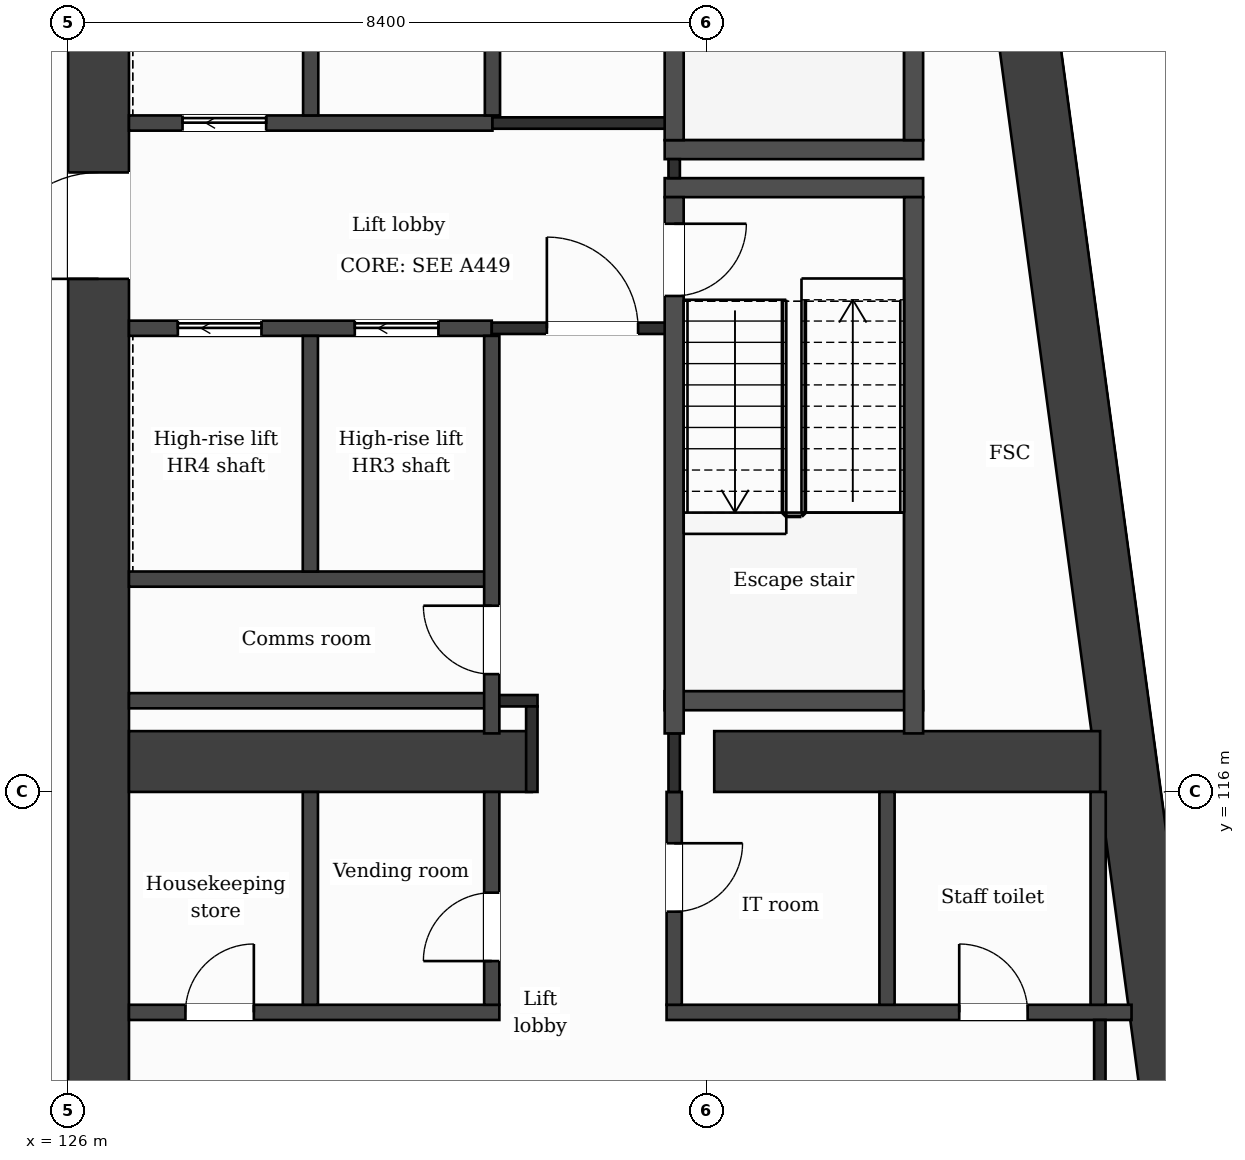
"""IFC4 building model, lengths in metres.
Left out: names, types, materials, properties, quantities, classifications, styles, units other than length and angle.
Written with IfcOpenShell. Run it as: python <this file> out.ifc"""

import sys

from ifc_helpers import new_model, si_unit, direction, frame, frame_2d, origin, place, context, subcontext, project, spatial, rectangle, extrude, element, fill, save


model = new_model("IFC4")
c1 = context("Model", 3, precision=1e-05, world=origin(), true_north=direction((0.0, 1.0)))
c2 = subcontext(c1, "Body", "Model", "MODEL_VIEW")
j1 = project(units=[si_unit("LENGTHUNIT", "METRE"), si_unit("PLANEANGLEUNIT", "RADIAN")], contexts=[c1])
p1 = place(None, origin())
s1 = spatial("IfcSite", under=j1, at=p1, CompositionType="ELEMENT")
p2 = place(p1, origin())
s2 = spatial("IfcBuilding", under=s1, at=p2, CompositionType="ELEMENT")
p3 = place(p2, frame((0.0, 0.0, 202.2)))
s3 = spatial("IfcBuildingStorey", under=s2, at=p3, CompositionType="ELEMENT", Elevation=202.2)
p4 = place(p3, frame((137.82, 132.0, 0.0), z_axis=(0.0, 0.0, 1.0), x_axis=(0.133408347329, -0.991061154956, 0.0)))
e1 = element("IfcWall", 1, at=p4, inside=s3, PredefinedType="SHEAR", context=c2, shape_type="SweptSolid", body=[
    extrude(rectangle(XDim=21.391, YDim=0.8, at=frame_2d((10.696, 0.0))), origin(), (0.0, 0.0, 1.0), 3.7),
])
p5 = place(p3, frame((126.4, 110.8, 0.0), z_axis=(0.0, 0.0, 1.0), x_axis=(0.0, 1.0, 0.0)))
e2 = element("IfcWall", 2, at=p5, inside=s3, PredefinedType="SHEAR", context=c2, shape_type="SweptSolid", body=[
    extrude(rectangle(XDim=21.2, YDim=0.8, at=frame_2d((10.6, 0.0))), origin(), (0.0, 0.0, 1.0), 3.7),
])
p6 = place(p5, frame((11.95, 0.0, 0.0)))
e3 = element("IfcOpeningElement", 3, at=p6, cuts=e2, PredefinedType="OPENING", context=c2, shape_type="SweptSolid", body=[
    extrude(rectangle(XDim=1.4, YDim=2.1, at=frame_2d((0.7, 1.05))), frame((0.0, 0.41, 0.0), z_axis=(0.0, -1.0, 0.0), x_axis=(1.0, 0.0, 0.0)), (0.0, 0.0, 1.0), 0.82),
])
p7 = place(p3, frame((126.8, 116.4, 0.0), z_axis=(0.0, 0.0, 1.0), x_axis=(1.0, 0.0, 0.0)))
e4 = element("IfcWall", 4, at=p7, inside=s3, PredefinedType="SHEAR", context=c2, shape_type="SweptSolid", body=[
    extrude(rectangle(XDim=5.3, YDim=0.8, at=frame_2d((2.65, 0.0))), origin(), (0.0, 0.0, 1.0), 3.7),
])
p8 = place(p3, frame((134.5, 116.4, 0.0), z_axis=(0.0, 0.0, 1.0), x_axis=(1.0, 0.0, 0.0)))
e5 = element("IfcWall", 5, at=p8, inside=s3, PredefinedType="SHEAR", context=c2, shape_type="SweptSolid", body=[
    extrude(rectangle(XDim=5.077, YDim=0.8, at=frame_2d((2.539, 0.0))), origin(), (0.0, 0.0, 1.0), 3.7),
])
p9 = place(p3, frame((126.8, 113.1, 0.0), z_axis=(0.0, 0.0, 1.0), x_axis=(1.0, 0.0, 0.0)))
e6 = element("IfcWall", 6, at=p9, inside=s3, PredefinedType="PARTITIONING", context=c2, shape_type="SweptSolid", body=[
    extrude(rectangle(XDim=4.873, YDim=0.2, at=frame_2d((2.437, 0.0))), origin(), (0.0, 0.0, 1.0), 3.38),
])
p10 = place(p9, frame((0.743, 0.0, 0.0)))
e7 = element("IfcOpeningElement", 7, at=p10, cuts=e6, PredefinedType="OPENING", context=c2, shape_type="SweptSolid", body=[
    extrude(rectangle(XDim=0.9, YDim=2.1, at=frame_2d((0.45, 1.05))), frame((0.0, 0.11, 0.0), z_axis=(0.0, -1.0, 0.0), x_axis=(1.0, 0.0, 0.0)), (0.0, 0.0, 1.0), 0.22),
])
p11 = place(p3, frame((133.873, 113.1, 0.0), z_axis=(0.0, 0.0, 1.0), x_axis=(1.0, 0.0, 0.0)))
e8 = element("IfcWall", 8, at=p11, inside=s3, PredefinedType="PARTITIONING", context=c2, shape_type="SweptSolid", body=[
    extrude(rectangle(XDim=6.117, YDim=0.2, at=frame_2d((3.059, 0.0))), origin(), (0.0, 0.0, 1.0), 3.38),
])
p12 = place(p11, frame((3.85, 0.0, 0.0)))
e9 = element("IfcOpeningElement", 9, at=p12, cuts=e8, PredefinedType="OPENING", context=c2, shape_type="SweptSolid", body=[
    extrude(rectangle(XDim=0.9, YDim=2.1, at=frame_2d((0.45, 1.05))), frame((0.0, 0.11, 0.0), z_axis=(0.0, -1.0, 0.0), x_axis=(1.0, 0.0, 0.0)), (0.0, 0.0, 1.0), 0.22),
])
p13 = place(p3, frame((126.8, 117.2, 0.0), z_axis=(0.0, 0.0, 1.0), x_axis=(1.0, 0.0, 0.0)))
e10 = element("IfcWall", 10, at=p13, inside=s3, PredefinedType="PARTITIONING", context=c2, shape_type="SweptSolid", body=[
    extrude(rectangle(XDim=4.773, YDim=0.2, at=frame_2d((2.386, 0.0))), origin(), (0.0, 0.0, 1.0), 3.38),
])
p14 = place(p3, frame((131.573, 117.2, 0.0), z_axis=(0.0, 0.0, 1.0), x_axis=(1.0, 0.0, 0.0)))
e11 = element("IfcWall", 11, at=p14, inside=s3, PredefinedType="PARTITIONING", context=c2, shape_type="SweptSolid", body=[
    extrude(rectangle(XDim=0.602, YDim=0.15, at=frame_2d((0.301, 0.0))), origin(), (0.0, 0.0, 1.0), 3.38),
])
p15 = place(p3, frame((133.848, 117.2, 0.0), z_axis=(0.0, 0.0, 1.0), x_axis=(1.0, 0.0, 0.0)))
e12 = element("IfcWall", 12, at=p15, inside=s3, PredefinedType="PARTITIONING", context=c2, shape_type="SweptSolid", body=[
    extrude(rectangle(XDim=3.4, YDim=0.25, at=frame_2d((1.7, 0.0))), origin(), (0.0, 0.0, 1.0), 3.38),
])
p16 = place(p3, frame((126.8, 118.8, 0.0), z_axis=(0.0, 0.0, 1.0), x_axis=(1.0, 0.0, 0.0)))
e13 = element("IfcWall", 13, at=p16, inside=s3, PredefinedType="PARTITIONING", context=c2, shape_type="SweptSolid", body=[
    extrude(rectangle(XDim=4.773, YDim=0.2, at=frame_2d((2.386, 0.0))), origin(), (0.0, 0.0, 1.0), 3.38),
])
p17 = place(p3, frame((126.8, 122.1, 0.0), z_axis=(0.0, 0.0, 1.0), x_axis=(1.0, 0.0, 0.0)))
e14 = element("IfcWall", 14, at=p17, inside=s3, PredefinedType="PARTITIONING", context=c2, shape_type="SweptSolid", body=[
    extrude(rectangle(XDim=4.773, YDim=0.2, at=frame_2d((2.386, 0.0))), origin(), (0.0, 0.0, 1.0), 3.38),
])
p18 = place(p17, frame((2.971, 0.0, 0.0)))
e15 = element("IfcOpeningElement", 15, at=p18, cuts=e14, PredefinedType="OPENING", context=c2, shape_type="SweptSolid", body=[
    extrude(rectangle(XDim=1.1, YDim=2.1, at=frame_2d((0.55, 1.05))), frame((0.0, 0.11, 0.0), z_axis=(0.0, -1.0, 0.0), x_axis=(1.0, 0.0, 0.0)), (0.0, 0.0, 1.0), 0.22),
])
p19 = place(p17, frame((0.643, 0.0, 0.0)))
e16 = element("IfcOpeningElement", 16, at=p19, cuts=e14, PredefinedType="OPENING", context=c2, shape_type="SweptSolid", body=[
    extrude(rectangle(XDim=1.1, YDim=2.1, at=frame_2d((0.55, 1.05))), frame((0.0, 0.11, 0.0), z_axis=(0.0, -1.0, 0.0), x_axis=(1.0, 0.0, 0.0)), (0.0, 0.0, 1.0), 0.22),
])
p20 = place(p3, frame((131.573, 122.1, 0.0), z_axis=(0.0, 0.0, 1.0), x_axis=(1.0, 0.0, 0.0)))
e17 = element("IfcWall", 17, at=p20, inside=s3, PredefinedType="PARTITIONING", context=c2, shape_type="SweptSolid", body=[
    extrude(rectangle(XDim=2.4, YDim=0.15, at=frame_2d((1.2, 0.0))), origin(), (0.0, 0.0, 1.0), 3.38),
])
p21 = place(p20, frame((0.725, 0.0, 0.0)))
e18 = element("IfcOpeningElement", 18, at=p21, cuts=e17, PredefinedType="OPENING", context=c2, shape_type="SweptSolid", body=[
    extrude(rectangle(XDim=1.2, YDim=2.1, at=frame_2d((0.6, 1.05))), frame((0.0, 0.085, 0.0), z_axis=(0.0, -1.0, 0.0), x_axis=(1.0, 0.0, 0.0)), (0.0, 0.0, 1.0), 0.17),
])
for number, where, z_axis, x_axis in (
    (19, (133.848, 123.95, 0.0), (0.0, 0.0, 1.0), (1.0, 0.0, 0.0)),
    (20, (133.848, 124.45, 0.0), (0.0, 0.0, 1.0), (1.0, 0.0, 0.0)),
):
    element("IfcWall", number, at=place(p3, frame(where, z_axis=z_axis, x_axis=x_axis)), inside=s3, PredefinedType="PARTITIONING", context=c2, shape_type="SweptSolid", body=[
        extrude(rectangle(XDim=3.4, YDim=0.25, at=frame_2d((1.7, 0.0))), origin(), (0.0, 0.0, 1.0), 3.38),
    ])
p22 = place(p3, frame((126.8, 124.8, 0.0), z_axis=(0.0, 0.0, 1.0), x_axis=(1.0, 0.0, 0.0)))
e21 = element("IfcWall", 21, at=p22, inside=s3, PredefinedType="PARTITIONING", context=c2, shape_type="SweptSolid", body=[
    extrude(rectangle(XDim=4.782, YDim=0.2, at=frame_2d((2.391, 0.0))), origin(), (0.0, 0.0, 1.0), 3.38),
])
p23 = place(p22, frame((0.705, 0.0, 0.0)))
e22 = element("IfcOpeningElement", 22, at=p23, cuts=e21, PredefinedType="OPENING", context=c2, shape_type="SweptSolid", body=[
    extrude(rectangle(XDim=1.1, YDim=2.1, at=frame_2d((0.55, 1.05))), frame((0.0, 0.11, 0.0), z_axis=(0.0, -1.0, 0.0), x_axis=(1.0, 0.0, 0.0)), (0.0, 0.0, 1.0), 0.22),
])
p24 = place(p3, frame((131.582, 124.8, 0.0), z_axis=(0.0, 0.0, 1.0), x_axis=(1.0, 0.0, 0.0)))
e23 = element("IfcWall", 23, at=p24, inside=s3, PredefinedType="PARTITIONING", context=c2, shape_type="SweptSolid", body=[
    extrude(rectangle(XDim=2.516, YDim=0.15, at=frame_2d((1.258, 0.0))), origin(), (0.0, 0.0, 1.0), 3.38),
])
p25 = place(p3, frame((129.187, 113.2, 0.0), z_axis=(0.0, 0.0, 1.0), x_axis=(0.0, 1.0, 0.0)))
e24 = element("IfcWall", 24, at=p25, inside=s3, PredefinedType="PARTITIONING", context=c2, shape_type="SweptSolid", body=[
    extrude(rectangle(XDim=2.8, YDim=0.2, at=frame_2d((1.4, 0.0))), origin(), (0.0, 0.0, 1.0), 3.38),
])
for number, where, z_axis, x_axis in (
    (25, (129.187, 118.9, 0.0), (0.0, 0.0, 1.0), (0.0, 1.0, 0.0)),
    (26, (129.191, 124.9, 0.0), (0.0, 0.0, 1.0), (0.0, 1.0, 0.0)),
):
    element("IfcWall", number, at=place(p3, frame(where, z_axis=z_axis, x_axis=x_axis)), inside=s3, PredefinedType="PARTITIONING", context=c2, shape_type="SweptSolid", body=[
        extrude(rectangle(XDim=3.1, YDim=0.2, at=frame_2d((1.55, 0.0))), origin(), (0.0, 0.0, 1.0), 3.38),
    ])
p26 = place(p3, frame((131.573, 113.2, 0.0), z_axis=(0.0, 0.0, 1.0), x_axis=(0.0, 1.0, 0.0)))
e27 = element("IfcWall", 27, at=p26, inside=s3, PredefinedType="PARTITIONING", context=c2, shape_type="SweptSolid", body=[
    extrude(rectangle(XDim=2.8, YDim=0.2, at=frame_2d((1.4, 0.0))), origin(), (0.0, 0.0, 1.0), 3.38),
])
p27 = place(p26, frame((0.575, 0.0, 0.0)))
e28 = element("IfcOpeningElement", 28, at=p27, cuts=e27, PredefinedType="OPENING", context=c2, shape_type="SweptSolid", body=[
    extrude(rectangle(XDim=0.9, YDim=2.1, at=frame_2d((0.45, 1.05))), frame((0.0, 0.11, 0.0), z_axis=(0.0, -1.0, 0.0), x_axis=(1.0, 0.0, 0.0)), (0.0, 0.0, 1.0), 0.22),
])
p28 = place(p3, frame((131.573, 116.77, 0.0), z_axis=(0.0, 0.0, 1.0), x_axis=(0.0, 1.0, 0.0)))
e29 = element("IfcWall", 29, at=p28, inside=s3, PredefinedType="PARTITIONING", context=c2, shape_type="SweptSolid", body=[
    extrude(rectangle(XDim=5.23, YDim=0.2, at=frame_2d((2.615, 0.0))), origin(), (0.0, 0.0, 1.0), 3.38),
])
p29 = place(p28, frame((0.78, 0.0, 0.0)))
e30 = element("IfcOpeningElement", 30, at=p29, cuts=e29, PredefinedType="OPENING", context=c2, shape_type="SweptSolid", body=[
    extrude(rectangle(XDim=0.9, YDim=2.1, at=frame_2d((0.45, 1.05))), frame((0.0, 0.11, 0.0), z_axis=(0.0, -1.0, 0.0), x_axis=(1.0, 0.0, 0.0)), (0.0, 0.0, 1.0), 0.22),
])
p30 = place(p3, frame((131.582, 124.9, 0.0), z_axis=(0.0, 0.0, 1.0), x_axis=(0.0, 1.0, 0.0)))
e31 = element("IfcWall", 31, at=p30, inside=s3, PredefinedType="PARTITIONING", context=c2, shape_type="SweptSolid", body=[
    extrude(rectangle(XDim=3.1, YDim=0.2, at=frame_2d((1.55, 0.0))), origin(), (0.0, 0.0, 1.0), 3.38),
])
p31 = place(p3, frame((132.1, 116.0, 0.0), z_axis=(0.0, 0.0, 1.0), x_axis=(0.0, 1.0, 0.0)))
e32 = element("IfcWall", 32, at=p31, inside=s3, PredefinedType="PARTITIONING", context=c2, shape_type="SweptSolid", body=[
    extrude(rectangle(XDim=1.125, YDim=0.15, at=frame_2d((0.562, 0.0))), origin(), (0.0, 0.0, 1.0), 3.38),
])
p32 = place(p3, frame((133.973, 113.2, 0.0), z_axis=(0.0, 0.0, 1.0), x_axis=(0.0, 1.0, 0.0)))
e33 = element("IfcWall", 33, at=p32, inside=s3, PredefinedType="PARTITIONING", context=c2, shape_type="SweptSolid", body=[
    extrude(rectangle(XDim=2.8, YDim=0.2, at=frame_2d((1.4, 0.0))), origin(), (0.0, 0.0, 1.0), 3.38),
])
p33 = place(p32, frame((1.225, 0.0, 0.0)))
e34 = element("IfcOpeningElement", 34, at=p33, cuts=e33, PredefinedType="OPENING", context=c2, shape_type="SweptSolid", body=[
    extrude(rectangle(XDim=0.9, YDim=2.1, at=frame_2d((0.45, 1.05))), frame((0.0, 0.11, 0.0), z_axis=(0.0, -1.0, 0.0), x_axis=(1.0, 0.0, 0.0)), (0.0, 0.0, 1.0), 0.22),
])
p34 = place(p3, frame((133.973, 116.0, 0.0), z_axis=(0.0, 0.0, 1.0), x_axis=(0.0, 1.0, 0.0)))
e35 = element("IfcWall", 35, at=p34, inside=s3, PredefinedType="PARTITIONING", context=c2, shape_type="SweptSolid", body=[
    extrude(rectangle(XDim=0.77, YDim=0.15, at=frame_2d((0.385, 0.0))), origin(), (0.0, 0.0, 1.0), 3.38),
])
p35 = place(p3, frame((133.973, 124.075, 0.0), z_axis=(0.0, 0.0, 1.0), x_axis=(0.0, 1.0, 0.0)))
e36 = element("IfcWall", 36, at=p35, inside=s3, PredefinedType="PARTITIONING", context=c2, shape_type="SweptSolid", body=[
    extrude(rectangle(XDim=0.25, YDim=0.15, at=frame_2d((0.125, 0.0))), origin(), (0.0, 0.0, 1.0), 3.38),
])
p36 = place(p3, frame((133.973, 116.77, 0.0), z_axis=(0.0, 0.0, 1.0), x_axis=(0.0, 1.0, 0.0)))
e37 = element("IfcWall", 37, at=p36, inside=s3, PredefinedType="PARTITIONING", context=c2, shape_type="SweptSolid", body=[
    extrude(rectangle(XDim=7.055, YDim=0.25, at=frame_2d((3.527, 0.0))), origin(), (0.0, 0.0, 1.0), 3.38),
])
p37 = place(p36, frame((5.755, 0.0, 0.0)))
e38 = element("IfcOpeningElement", 38, at=p37, cuts=e37, PredefinedType="OPENING", context=c2, shape_type="SweptSolid", body=[
    extrude(rectangle(XDim=0.95, YDim=2.1, at=frame_2d((0.475, 1.05))), frame((0.0, 0.135, 0.0), z_axis=(0.0, -1.0, 0.0), x_axis=(1.0, 0.0, 0.0)), (0.0, 0.0, 1.0), 0.27),
])
p38 = place(p3, frame((133.973, 124.575, 0.0), z_axis=(0.0, 0.0, 1.0), x_axis=(0.0, 1.0, 0.0)))
e39 = element("IfcWall", 39, at=p38, inside=s3, PredefinedType="PARTITIONING", context=c2, shape_type="SweptSolid", body=[
    extrude(rectangle(XDim=7.055, YDim=0.25, at=frame_2d((3.527, 0.0))), origin(), (0.0, 0.0, 1.0), 3.38),
])
p39 = place(p38, frame((5.325, 0.0, 0.0)))
e40 = element("IfcOpeningElement", 40, at=p39, cuts=e39, PredefinedType="OPENING", context=c2, shape_type="SweptSolid", body=[
    extrude(rectangle(XDim=1.0, YDim=2.1, at=frame_2d((0.5, 1.05))), frame((0.0, 0.135, 0.0), z_axis=(0.0, -1.0, 0.0), x_axis=(1.0, 0.0, 0.0)), (0.0, 0.0, 1.0), 0.27),
])
p40 = place(p3, frame((136.773, 113.2, 0.0), z_axis=(0.0, 0.0, 1.0), x_axis=(0.0, 1.0, 0.0)))
e41 = element("IfcWall", 41, at=p40, inside=s3, PredefinedType="PARTITIONING", context=c2, shape_type="SweptSolid", body=[
    extrude(rectangle(XDim=2.8, YDim=0.2, at=frame_2d((1.4, 0.0))), origin(), (0.0, 0.0, 1.0), 3.38),
])
for number, where, z_axis, x_axis in (
    (42, (137.123, 116.77, 0.0), (0.0, 0.0, 1.0), (0.0, 1.0, 0.0)),
    (43, (137.123, 124.575, 0.0), (0.0, 0.0, 1.0), (0.0, 1.0, 0.0)),
):
    element("IfcWall", number, at=place(p3, frame(where, z_axis=z_axis, x_axis=x_axis)), inside=s3, PredefinedType="PARTITIONING", context=c2, shape_type="SweptSolid", body=[
        extrude(rectangle(XDim=7.055, YDim=0.25, at=frame_2d((3.527, 0.0))), origin(), (0.0, 0.0, 1.0), 3.38),
    ])
p41 = place(p3, frame((139.551, 113.2, 0.0), z_axis=(0.0, 0.0, 1.0), x_axis=(0.0, 1.0, 0.0)))
e44 = element("IfcWall", 44, at=p41, inside=s3, PredefinedType="PARTITIONING", context=c2, shape_type="SweptSolid", body=[
    extrude(rectangle(XDim=2.8, YDim=0.2, at=frame_2d((1.4, 0.0))), origin(), (0.0, 0.0, 1.0), 3.38),
])
p42 = place(p3, frame((139.573, 111.2, 0.0), z_axis=(0.0, 0.0, 1.0), x_axis=(0.0, 1.0, 0.0)))
e45 = element("IfcWall", 45, at=p42, inside=s3, PredefinedType="PARTITIONING", context=c2, shape_type="SweptSolid", body=[
    extrude(rectangle(XDim=1.8, YDim=0.15, at=frame_2d((0.9, 0.0))), origin(), (0.0, 0.0, 1.0), 3.38),
])
p43 = place(p21, origin())
e46 = element("IfcDoor", 46, at=p43, inside=s3, OperationType="SINGLE_SWING_LEFT", PredefinedType="DOOR", context=c2, shape_type="SweptSolid", body=[
    extrude(rectangle(XDim=1.2, YDim=2.1, at=frame_2d((0.6, 1.05))), frame((0.0, 0.025, 0.0), z_axis=(0.0, -1.0, 0.0), x_axis=(1.0, 0.0, 0.0)), (0.0, 0.0, 1.0), 0.05),
])
fill(e18, e46)
p44 = place(p18, origin())
e47 = element("IfcDoor", 47, at=p44, inside=s3, OperationType="SLIDING_TO_LEFT", PredefinedType="DOOR", context=c2, shape_type="SweptSolid", body=[
    extrude(rectangle(XDim=1.1, YDim=2.1, at=frame_2d((0.55, 1.05))), frame((0.0, 0.025, 0.0), z_axis=(0.0, -1.0, 0.0), x_axis=(1.0, 0.0, 0.0)), (0.0, 0.0, 1.0), 0.05),
])
fill(e15, e47)
p45 = place(p19, origin())
e48 = element("IfcDoor", 48, at=p45, inside=s3, OperationType="SLIDING_TO_LEFT", PredefinedType="DOOR", context=c2, shape_type="SweptSolid", body=[
    extrude(rectangle(XDim=1.1, YDim=2.1, at=frame_2d((0.55, 1.05))), frame((0.0, 0.025, 0.0), z_axis=(0.0, -1.0, 0.0), x_axis=(1.0, 0.0, 0.0)), (0.0, 0.0, 1.0), 0.05),
])
fill(e16, e48)
p46 = place(p23, origin())
e49 = element("IfcDoor", 49, at=p46, inside=s3, OperationType="SLIDING_TO_LEFT", PredefinedType="DOOR", context=c2, shape_type="SweptSolid", body=[
    extrude(rectangle(XDim=1.1, YDim=2.1, at=frame_2d((0.55, 1.05))), frame((0.0, 0.025, 0.0), z_axis=(0.0, -1.0, 0.0), x_axis=(1.0, 0.0, 0.0)), (0.0, 0.0, 1.0), 0.05),
])
fill(e22, e49)
p47 = place(p37, origin())
e50 = element("IfcDoor", 50, at=p47, inside=s3, OperationType="SINGLE_SWING_RIGHT", PredefinedType="DOOR", context=c2, shape_type="SweptSolid", body=[
    extrude(rectangle(XDim=0.95, YDim=2.1, at=frame_2d((0.475, 1.05))), frame((0.0, 0.025, 0.0), z_axis=(0.0, -1.0, 0.0), x_axis=(1.0, 0.0, 0.0)), (0.0, 0.0, 1.0), 0.05),
])
fill(e38, e50)
p48 = place(p29, origin())
e51 = element("IfcDoor", 51, at=p48, inside=s3, OperationType="SINGLE_SWING_RIGHT", PredefinedType="DOOR", context=c2, shape_type="SweptSolid", body=[
    extrude(rectangle(XDim=0.9, YDim=2.1, at=frame_2d((0.45, 1.05))), frame((0.0, 0.025, 0.0), z_axis=(0.0, -1.0, 0.0), x_axis=(1.0, 0.0, 0.0)), (0.0, 0.0, 1.0), 0.05),
])
fill(e30, e51)
p49 = place(p12, origin())
e52 = element("IfcDoor", 52, at=p49, inside=s3, OperationType="SINGLE_SWING_LEFT", PredefinedType="DOOR", context=c2, shape_type="SweptSolid", body=[
    extrude(rectangle(XDim=0.9, YDim=2.1, at=frame_2d((0.45, 1.05))), frame((0.0, 0.025, 0.0), z_axis=(0.0, -1.0, 0.0), x_axis=(1.0, 0.0, 0.0)), (0.0, 0.0, 1.0), 0.05),
])
fill(e9, e52)
p50 = place(p33, origin())
e53 = element("IfcDoor", 53, at=p50, inside=s3, OperationType="SINGLE_SWING_RIGHT", PredefinedType="DOOR", context=c2, shape_type="SweptSolid", body=[
    extrude(rectangle(XDim=0.9, YDim=2.1, at=frame_2d((0.45, 1.05))), frame((0.0, 0.025, 0.0), z_axis=(0.0, -1.0, 0.0), x_axis=(1.0, 0.0, 0.0)), (0.0, 0.0, 1.0), 0.05),
])
fill(e34, e53)
p51 = place(p27, origin())
e54 = element("IfcDoor", 54, at=p51, inside=s3, OperationType="SINGLE_SWING_LEFT", PredefinedType="DOOR", context=c2, shape_type="SweptSolid", body=[
    extrude(rectangle(XDim=0.9, YDim=2.1, at=frame_2d((0.45, 1.05))), frame((0.0, 0.025, 0.0), z_axis=(0.0, -1.0, 0.0), x_axis=(1.0, 0.0, 0.0)), (0.0, 0.0, 1.0), 0.05),
])
fill(e28, e54)
p52 = place(p10, origin())
e55 = element("IfcDoor", 55, at=p52, inside=s3, OperationType="SINGLE_SWING_RIGHT", PredefinedType="DOOR", context=c2, shape_type="SweptSolid", body=[
    extrude(rectangle(XDim=0.9, YDim=2.1, at=frame_2d((0.45, 1.05))), frame((0.0, 0.025, 0.0), z_axis=(0.0, -1.0, 0.0), x_axis=(1.0, 0.0, 0.0)), (0.0, 0.0, 1.0), 0.05),
])
fill(e7, e55)
p53 = place(p6, origin())
e56 = element("IfcDoor", 56, at=p53, inside=s3, OperationType="SINGLE_SWING_LEFT", PredefinedType="DOOR", context=c2, shape_type="SweptSolid", body=[
    extrude(rectangle(XDim=1.4, YDim=2.1, at=frame_2d((0.7, 1.05))), frame((0.0, 0.025, 0.0), z_axis=(0.0, -1.0, 0.0), x_axis=(1.0, 0.0, 0.0)), (0.0, 0.0, 1.0), 0.05),
])
fill(e3, e56)
save(model, sys.argv[1])
